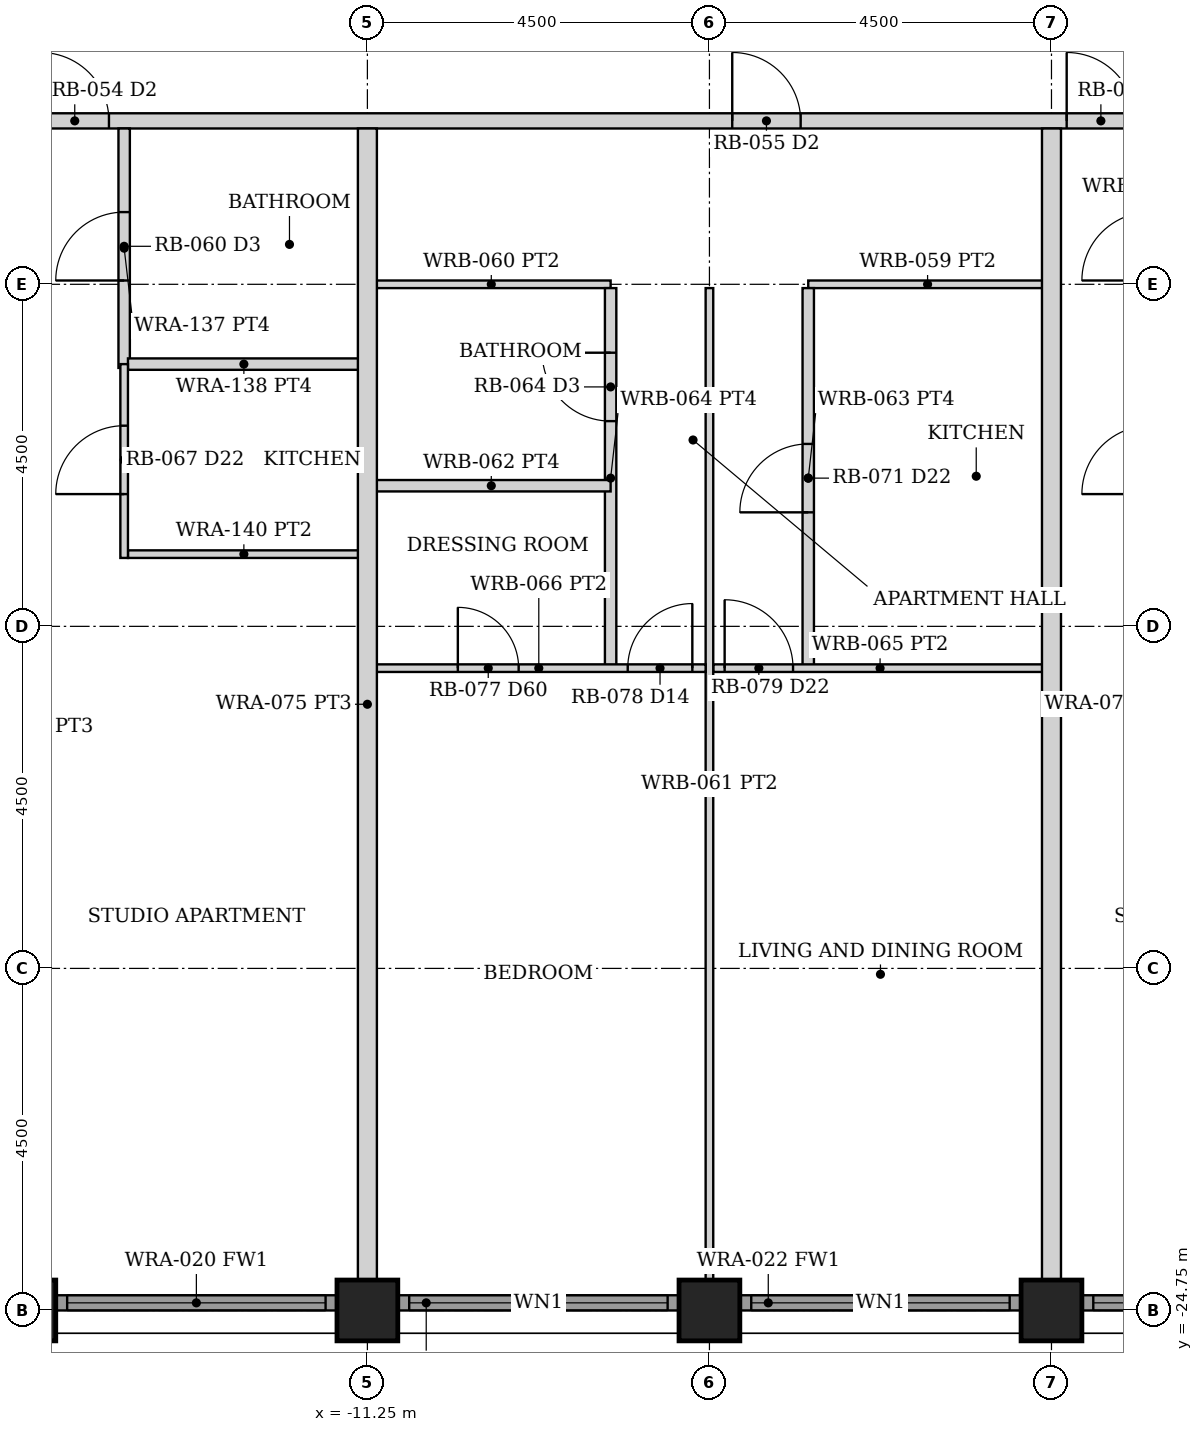
"""IFC4 building model, lengths in metres.
Left out: names, types, materials, properties, quantities, classifications, styles, units other than length and angle.
Written with IfcOpenShell. Run it as: python <this file> out.ifc"""

import sys

from ifc_helpers import new_model, si_unit, direction, frame, frame_2d, origin, origin_2d, place, context, subcontext, project, spatial, rectangle, hollow_rectangle, extrude, element, fill, save


model = new_model("IFC4")
c1 = context("Model", 3, precision=1e-05, world=origin(), true_north=direction((0.0, 1.0)))
c2 = subcontext(c1, "Body", "Model", "MODEL_VIEW")
j1 = project(units=[si_unit("LENGTHUNIT", "METRE"), si_unit("PLANEANGLEUNIT", "RADIAN")], contexts=[c1])
p1 = place(None, origin())
s1 = spatial("IfcSite", under=j1, at=p1, CompositionType="ELEMENT")
p2 = place(p1, origin())
s2 = spatial("IfcBuilding", under=s1, at=p2, CompositionType="ELEMENT")
p3 = place(p2, frame((0.0, 0.0, 37.0)))
s3 = spatial("IfcBuildingStorey", under=s2, at=p3, CompositionType="ELEMENT", Elevation=37.0)
for number, where, z_axis, x_axis in (
    (1, (-15.75, -24.75, 0.0), (0.0, 0.0, 1.0), (0.0, 1.0, 0.0)),
    (2, (-11.25, -24.75, 0.0), (0.0, 0.0, 1.0), (0.0, 1.0, 0.0)),
    (3, (-6.75, -24.75, 0.0), (0.0, 0.0, 1.0), (0.0, 1.0, 0.0)),
    (4, (-2.25, -24.75, 0.0), (0.0, 0.0, 1.0), (0.0, 1.0, 0.0)),
):
    element("IfcColumn", number, at=place(p3, frame(where, z_axis=z_axis, x_axis=x_axis)), inside=s3, PredefinedType="COLUMN", context=c2, shape_type="SweptSolid", body=[
        extrude(hollow_rectangle(XDim=0.8, YDim=0.8, WallThickness=0.07, at=origin_2d()), origin(), (0.0, 0.0, 1.0), 3.5),
    ])
p4 = place(p3, frame((-15.345, -24.65, 0.0), z_axis=(0.0, 0.0, 1.0), x_axis=(1.0, 0.0, 0.0)))
e5 = element("IfcWall", 5, at=p4, inside=s3, PredefinedType="SOLIDWALL", context=c2, shape_type="SweptSolid", body=[
    extrude(rectangle(XDim=3.69, YDim=0.2, at=frame_2d((1.845, 0.0))), origin(), (0.0, 0.0, 1.0), 2.379),
])
p5 = place(p4, frame((0.145, 0.0, 0.3)))
e6 = element("IfcOpeningElement", 6, at=p5, cuts=e5, PredefinedType="OPENING", context=c2, shape_type="SweptSolid", body=[
    extrude(rectangle(XDim=3.4, YDim=1.929, at=frame_2d((1.7, 0.964))), frame((0.0, 0.11, 0.0), z_axis=(0.0, -1.0, 0.0), x_axis=(1.0, 0.0, 0.0)), (0.0, 0.0, 1.0), 0.22),
])
p6 = place(p3, frame((-10.845, -24.65, 0.0), z_axis=(0.0, 0.0, 1.0), x_axis=(1.0, 0.0, 0.0)))
e7 = element("IfcWall", 7, at=p6, inside=s3, PredefinedType="SOLIDWALL", context=c2, shape_type="SweptSolid", body=[
    extrude(rectangle(XDim=3.69, YDim=0.2, at=frame_2d((1.845, 0.0))), origin(), (0.0, 0.0, 1.0), 2.379),
])
p7 = place(p6, frame((0.145, 0.0, 0.3)))
e8 = element("IfcOpeningElement", 8, at=p7, cuts=e7, PredefinedType="OPENING", context=c2, shape_type="SweptSolid", body=[
    extrude(rectangle(XDim=3.4, YDim=1.929, at=frame_2d((1.7, 0.964))), frame((0.0, 0.11, 0.0), z_axis=(0.0, -1.0, 0.0), x_axis=(1.0, 0.0, 0.0)), (0.0, 0.0, 1.0), 0.22),
])
p8 = place(p3, frame((-6.345, -24.65, 0.0), z_axis=(0.0, 0.0, 1.0), x_axis=(1.0, 0.0, 0.0)))
e9 = element("IfcWall", 9, at=p8, inside=s3, PredefinedType="SOLIDWALL", context=c2, shape_type="SweptSolid", body=[
    extrude(rectangle(XDim=3.69, YDim=0.2, at=frame_2d((1.845, 0.0))), origin(), (0.0, 0.0, 1.0), 2.379),
])
p9 = place(p8, frame((0.145, 0.0, 0.3)))
e10 = element("IfcOpeningElement", 10, at=p9, cuts=e9, PredefinedType="OPENING", context=c2, shape_type="SweptSolid", body=[
    extrude(rectangle(XDim=3.4, YDim=1.929, at=frame_2d((1.7, 0.964))), frame((0.0, 0.11, 0.0), z_axis=(0.0, -1.0, 0.0), x_axis=(1.0, 0.0, 0.0)), (0.0, 0.0, 1.0), 0.22),
])
p10 = place(p3, frame((-1.845, -24.65, 0.0), z_axis=(0.0, 0.0, 1.0), x_axis=(1.0, 0.0, 0.0)))
e11 = element("IfcWall", 11, at=p10, inside=s3, PredefinedType="SOLIDWALL", context=c2, shape_type="SweptSolid", body=[
    extrude(rectangle(XDim=3.69, YDim=0.2, at=frame_2d((1.845, 0.0))), origin(), (0.0, 0.0, 1.0), 2.379),
])
p11 = place(p10, frame((0.145, 0.0, 0.3)))
e12 = element("IfcOpeningElement", 12, at=p11, cuts=e11, PredefinedType="OPENING", context=c2, shape_type="SweptSolid", body=[
    extrude(rectangle(XDim=3.4, YDim=1.929, at=frame_2d((1.7, 0.964))), frame((0.0, 0.11, 0.0), z_axis=(0.0, -1.0, 0.0), x_axis=(1.0, 0.0, 0.0)), (0.0, 0.0, 1.0), 0.22),
])
p12 = place(p3, frame((-24.55, -9.1, 0.0), z_axis=(0.0, 0.0, 1.0), x_axis=(1.0, 0.0, 0.0)))
e13 = element("IfcWall", 13, at=p12, inside=s3, PredefinedType="PARTITIONING", context=c2, shape_type="SweptSolid", body=[
    extrude(rectangle(XDim=49.1, YDim=0.2, at=frame_2d((24.55, 0.0))), origin(), (0.0, 0.0, 1.0), 2.373),
])
p13 = place(p12, frame((5.1, 0.0, 0.0)))
e14 = element("IfcOpeningElement", 14, at=p13, cuts=e13, PredefinedType="OPENING", context=c2, shape_type="SweptSolid", body=[
    extrude(rectangle(XDim=0.9, YDim=2.1, at=frame_2d((0.45, 1.05))), frame((0.0, 0.11, 0.0), z_axis=(0.0, -1.0, 0.0), x_axis=(1.0, 0.0, 0.0)), (0.0, 0.0, 1.0), 0.22),
])
p14 = place(p12, frame((9.0, 0.0, 0.0)))
e15 = element("IfcOpeningElement", 15, at=p14, cuts=e13, PredefinedType="OPENING", context=c2, shape_type="SweptSolid", body=[
    extrude(rectangle(XDim=0.9, YDim=2.1, at=frame_2d((0.45, 1.05))), frame((0.0, 0.11, 0.0), z_axis=(0.0, -1.0, 0.0), x_axis=(1.0, 0.0, 0.0)), (0.0, 0.0, 1.0), 0.22),
])
p15 = place(p12, frame((18.1, 0.0, 0.0)))
e16 = element("IfcOpeningElement", 16, at=p15, cuts=e13, PredefinedType="OPENING", context=c2, shape_type="SweptSolid", body=[
    extrude(rectangle(XDim=0.9, YDim=2.1, at=frame_2d((0.45, 1.05))), frame((0.0, 0.11, 0.0), z_axis=(0.0, -1.0, 0.0), x_axis=(1.0, 0.0, 0.0)), (0.0, 0.0, 1.0), 0.22),
])
p16 = place(p12, frame((22.5, 0.0, 0.0)))
e17 = element("IfcOpeningElement", 17, at=p16, cuts=e13, PredefinedType="OPENING", context=c2, shape_type="SweptSolid", body=[
    extrude(rectangle(XDim=0.9, YDim=2.1, at=frame_2d((0.45, 1.05))), frame((0.0, 0.11, 0.0), z_axis=(0.0, -1.0, 0.0), x_axis=(1.0, 0.0, 0.0)), (0.0, 0.0, 1.0), 0.22),
])
p17 = place(p12, frame((27.1, 0.0, 0.0)))
e18 = element("IfcOpeningElement", 18, at=p17, cuts=e13, PredefinedType="OPENING", context=c2, shape_type="SweptSolid", body=[
    extrude(rectangle(XDim=0.9, YDim=2.1, at=frame_2d((0.45, 1.05))), frame((0.0, 0.11, 0.0), z_axis=(0.0, -1.0, 0.0), x_axis=(1.0, 0.0, 0.0)), (0.0, 0.0, 1.0), 0.22),
])
p18 = place(p12, frame((36.0, 0.0, 0.0)))
e19 = element("IfcOpeningElement", 19, at=p18, cuts=e13, PredefinedType="OPENING", context=c2, shape_type="SweptSolid", body=[
    extrude(rectangle(XDim=0.9, YDim=2.1, at=frame_2d((0.45, 1.05))), frame((0.0, 0.11, 0.0), z_axis=(0.0, -1.0, 0.0), x_axis=(1.0, 0.0, 0.0)), (0.0, 0.0, 1.0), 0.22),
])
p19 = place(p12, frame((43.1, 0.0, 0.0)))
e20 = element("IfcOpeningElement", 20, at=p19, cuts=e13, PredefinedType="OPENING", context=c2, shape_type="SweptSolid", body=[
    extrude(rectangle(XDim=0.9, YDim=2.1, at=frame_2d((0.45, 1.05))), frame((0.0, 0.11, 0.0), z_axis=(0.0, -1.0, 0.0), x_axis=(1.0, 0.0, 0.0)), (0.0, 0.0, 1.0), 0.22),
])
p20 = place(p3, frame((-14.45, -12.35, 0.0), z_axis=(0.0, 0.0, 1.0), x_axis=(0.0, 1.0, 0.0)))
e21 = element("IfcWall", 21, at=p20, inside=s3, PredefinedType="PARTITIONING", context=c2, shape_type="SweptSolid", body=[
    extrude(rectangle(XDim=3.15, YDim=0.15, at=frame_2d((1.575, 0.0))), origin(), (0.0, 0.0, 1.0), 2.373),
])
p21 = place(p20, frame((1.15, 0.0, 0.0)))
e22 = element("IfcOpeningElement", 22, at=p21, cuts=e21, PredefinedType="OPENING", context=c2, shape_type="SweptSolid", body=[
    extrude(rectangle(XDim=0.9, YDim=2.1, at=frame_2d((0.45, 1.05))), frame((0.0, 0.085, 0.0), z_axis=(0.0, -1.0, 0.0), x_axis=(1.0, 0.0, 0.0)), (0.0, 0.0, 1.0), 0.17),
])
p22 = place(p3, frame((-14.4, -12.3, 0.0), z_axis=(0.0, 0.0, 1.0), x_axis=(1.0, 0.0, 0.0)))
e23 = element("IfcWall", 23, at=p22, inside=s3, PredefinedType="PARTITIONING", context=c2, shape_type="SweptSolid", body=[
    extrude(rectangle(XDim=3.05, YDim=0.15, at=frame_2d((1.525, 0.0))), origin(), (0.0, 0.0, 1.0), 2.373),
])
p23 = place(p3, frame((-14.4, -14.8, 0.0), z_axis=(0.0, 0.0, 1.0), x_axis=(1.0, 0.0, 0.0)))
e24 = element("IfcWall", 24, at=p23, inside=s3, PredefinedType="PARTITIONING", context=c2, shape_type="SweptSolid", body=[
    extrude(rectangle(XDim=3.05, YDim=0.1, at=frame_2d((1.525, 0.0))), origin(), (0.0, 0.0, 1.0), 2.373),
])
p24 = place(p3, frame((-14.45, -14.85, 0.0), z_axis=(0.0, 0.0, 1.0), x_axis=(0.0, 1.0, 0.0)))
e25 = element("IfcWall", 25, at=p24, inside=s3, PredefinedType="PARTITIONING", context=c2, shape_type="SweptSolid", body=[
    extrude(rectangle(XDim=2.55, YDim=0.1, at=frame_2d((1.275, 0.0))), origin(), (0.0, 0.0, 1.0), 2.373),
])
p25 = place(p24, frame((0.84, 0.0, 0.0)))
e26 = element("IfcOpeningElement", 26, at=p25, cuts=e25, PredefinedType="OPENING", context=c2, shape_type="SweptSolid", body=[
    extrude(rectangle(XDim=0.9, YDim=2.1, at=frame_2d((0.45, 1.05))), frame((0.0, 0.06, 0.0), z_axis=(0.0, -1.0, 0.0), x_axis=(1.0, 0.0, 0.0)), (0.0, 0.0, 1.0), 0.12),
])
p26 = place(p3, frame((-5.45, -11.25, 0.0), z_axis=(0.0, 0.0, 1.0), x_axis=(1.0, 0.0, 0.0)))
e27 = element("IfcWall", 27, at=p26, inside=s3, PredefinedType="PARTITIONING", context=c2, shape_type="SweptSolid", body=[
    extrude(rectangle(XDim=3.14, YDim=0.1, at=frame_2d((1.57, 0.0))), origin(), (0.0, 0.0, 1.0), 2.373),
])
p27 = place(p3, frame((-5.45, -16.3, 0.0), z_axis=(0.0, 0.0, 1.0), x_axis=(0.0, 1.0, 0.0)))
e28 = element("IfcWall", 28, at=p27, inside=s3, PredefinedType="PARTITIONING", context=c2, shape_type="SweptSolid", body=[
    extrude(rectangle(XDim=5.0, YDim=0.15, at=frame_2d((2.5, 0.0))), origin(), (0.0, 0.0, 1.0), 2.373),
])
p28 = place(p27, frame((2.05, 0.0, 0.0)))
e29 = element("IfcOpeningElement", 29, at=p28, cuts=e28, PredefinedType="OPENING", context=c2, shape_type="SweptSolid", body=[
    extrude(rectangle(XDim=0.9, YDim=2.1, at=frame_2d((0.45, 1.05))), frame((0.0, 0.085, 0.0), z_axis=(0.0, -1.0, 0.0), x_axis=(1.0, 0.0, 0.0)), (0.0, 0.0, 1.0), 0.17),
])
p29 = place(p3, frame((-6.7, -16.3, 0.0), z_axis=(0.0, 0.0, 1.0), x_axis=(1.0, 0.0, 0.0)))
e30 = element("IfcWall", 30, at=p29, inside=s3, PredefinedType="PARTITIONING", context=c2, shape_type="SweptSolid", body=[
    extrude(rectangle(XDim=4.39, YDim=0.1, at=frame_2d((2.195, 0.0))), origin(), (0.0, 0.0, 1.0), 2.373),
])
p30 = place(p29, frame((0.15, 0.0, 0.0)))
e31 = element("IfcOpeningElement", 31, at=p30, cuts=e30, PredefinedType="OPENING", context=c2, shape_type="SweptSolid", body=[
    extrude(rectangle(XDim=0.9, YDim=2.1, at=frame_2d((0.45, 1.05))), frame((0.0, 0.06, 0.0), z_axis=(0.0, -1.0, 0.0), x_axis=(1.0, 0.0, 0.0)), (0.0, 0.0, 1.0), 0.12),
])
p31 = place(p3, frame((-6.75, -24.35, 0.0), z_axis=(0.0, 0.0, 1.0), x_axis=(0.0, 1.0, 0.0)))
e32 = element("IfcWall", 32, at=p31, inside=s3, PredefinedType="PARTITIONING", context=c2, shape_type="SweptSolid", body=[
    extrude(rectangle(XDim=13.05, YDim=0.1, at=frame_2d((6.525, 0.0))), origin(), (0.0, 0.0, 1.0), 2.373),
])
p32 = place(p3, frame((-11.19, -11.25, 0.0), z_axis=(0.0, 0.0, 1.0), x_axis=(1.0, 0.0, 0.0)))
e33 = element("IfcWall", 33, at=p32, inside=s3, PredefinedType="PARTITIONING", context=c2, shape_type="SweptSolid", body=[
    extrude(rectangle(XDim=3.14, YDim=0.1, at=frame_2d((1.57, 0.0))), origin(), (0.0, 0.0, 1.0), 2.373),
])
p33 = place(p3, frame((-8.05, -16.3, 0.0), z_axis=(0.0, 0.0, 1.0), x_axis=(0.0, 1.0, 0.0)))
e34 = element("IfcWall", 34, at=p33, inside=s3, PredefinedType="PARTITIONING", context=c2, shape_type="SweptSolid", body=[
    extrude(rectangle(XDim=5.0, YDim=0.15, at=frame_2d((2.5, 0.0))), origin(), (0.0, 0.0, 1.0), 2.373),
])
p34 = place(p33, frame((3.25, 0.0, 0.0)))
e35 = element("IfcOpeningElement", 35, at=p34, cuts=e34, PredefinedType="OPENING", context=c2, shape_type="SweptSolid", body=[
    extrude(rectangle(XDim=0.9, YDim=2.1, at=frame_2d((0.45, 1.05))), frame((0.0, 0.085, 0.0), z_axis=(0.0, -1.0, 0.0), x_axis=(1.0, 0.0, 0.0)), (0.0, 0.0, 1.0), 0.17),
])
p35 = place(p3, frame((-11.19, -16.3, 0.0), z_axis=(0.0, 0.0, 1.0), x_axis=(1.0, 0.0, 0.0)))
e36 = element("IfcWall", 36, at=p35, inside=s3, PredefinedType="PARTITIONING", context=c2, shape_type="SweptSolid", body=[
    extrude(rectangle(XDim=4.39, YDim=0.1, at=frame_2d((2.195, 0.0))), origin(), (0.0, 0.0, 1.0), 2.373),
])
p36 = place(p35, frame((3.365, 0.0, 0.0)))
e37 = element("IfcOpeningElement", 37, at=p36, cuts=e36, PredefinedType="OPENING", context=c2, shape_type="SweptSolid", body=[
    extrude(rectangle(XDim=0.85, YDim=2.1, at=frame_2d((0.425, 1.05))), frame((0.0, 0.06, 0.0), z_axis=(0.0, -1.0, 0.0), x_axis=(1.0, 0.0, 0.0)), (0.0, 0.0, 1.0), 0.12),
])
p37 = place(p35, frame((1.13, 0.0, 0.0)))
e38 = element("IfcOpeningElement", 38, at=p37, cuts=e36, PredefinedType="OPENING", context=c2, shape_type="SweptSolid", body=[
    extrude(rectangle(XDim=0.8, YDim=2.1, at=frame_2d((0.4, 1.05))), frame((0.0, 0.06, 0.0), z_axis=(0.0, -1.0, 0.0), x_axis=(1.0, 0.0, 0.0)), (0.0, 0.0, 1.0), 0.12),
])
p38 = place(p3, frame((-11.19, -13.9, 0.0), z_axis=(0.0, 0.0, 1.0), x_axis=(1.0, 0.0, 0.0)))
e39 = element("IfcWall", 39, at=p38, inside=s3, PredefinedType="PARTITIONING", context=c2, shape_type="SweptSolid", body=[
    extrude(rectangle(XDim=3.14, YDim=0.15, at=frame_2d((1.57, 0.0))), origin(), (0.0, 0.0, 1.0), 2.373),
])
for number, where, z_axis, x_axis in (
    (40, (-11.25, -24.35, 0.0), (0.0, 0.0, 1.0), (0.0, 1.0, 0.0)),
    (41, (-2.25, -24.35, 0.0), (0.0, 0.0, 1.0), (0.0, 1.0, 0.0)),
):
    element("IfcWall", number, at=place(p3, frame(where, z_axis=z_axis, x_axis=x_axis)), inside=s3, PredefinedType="PARTITIONING", context=c2, shape_type="SweptSolid", body=[
        extrude(rectangle(XDim=15.15, YDim=0.25, at=frame_2d((7.575, 0.0))), origin(), (0.0, 0.0, 1.0), 2.373),
    ])
p39 = place(p5, origin())
e42 = element("IfcWindow", 42, at=p39, inside=s3, PartitioningType="SINGLE_PANEL", PredefinedType="WINDOW", context=c2, shape_type="SweptSolid", body=[
    extrude(rectangle(XDim=3.4, YDim=1.929, at=frame_2d((1.7, 0.964))), frame((0.0, 0.03, 0.0), z_axis=(0.0, -1.0, 0.0), x_axis=(1.0, 0.0, 0.0)), (0.0, 0.0, 1.0), 0.06),
])
fill(e6, e42)
p40 = place(p7, origin())
e43 = element("IfcWindow", 43, at=p40, inside=s3, PartitioningType="SINGLE_PANEL", PredefinedType="WINDOW", context=c2, shape_type="SweptSolid", body=[
    extrude(rectangle(XDim=3.4, YDim=1.929, at=frame_2d((1.7, 0.964))), frame((0.0, 0.03, 0.0), z_axis=(0.0, -1.0, 0.0), x_axis=(1.0, 0.0, 0.0)), (0.0, 0.0, 1.0), 0.06),
])
fill(e8, e43)
p41 = place(p9, origin())
e44 = element("IfcWindow", 44, at=p41, inside=s3, PartitioningType="SINGLE_PANEL", PredefinedType="WINDOW", context=c2, shape_type="SweptSolid", body=[
    extrude(rectangle(XDim=3.4, YDim=1.929, at=frame_2d((1.7, 0.964))), frame((0.0, 0.03, 0.0), z_axis=(0.0, -1.0, 0.0), x_axis=(1.0, 0.0, 0.0)), (0.0, 0.0, 1.0), 0.06),
])
fill(e10, e44)
p42 = place(p11, origin())
e45 = element("IfcWindow", 45, at=p42, inside=s3, PartitioningType="SINGLE_PANEL", PredefinedType="WINDOW", context=c2, shape_type="SweptSolid", body=[
    extrude(rectangle(XDim=3.4, YDim=1.929, at=frame_2d((1.7, 0.964))), frame((0.0, 0.03, 0.0), z_axis=(0.0, -1.0, 0.0), x_axis=(1.0, 0.0, 0.0)), (0.0, 0.0, 1.0), 0.06),
])
fill(e12, e45)
p43 = place(p14, origin())
e46 = element("IfcDoor", 46, at=p43, inside=s3, OperationType="SINGLE_SWING_LEFT", PredefinedType="DOOR", context=c2, shape_type="SweptSolid", body=[
    extrude(rectangle(XDim=0.9, YDim=2.1, at=frame_2d((0.45, 1.05))), frame((0.0, 0.025, 0.0), z_axis=(0.0, -1.0, 0.0), x_axis=(1.0, 0.0, 0.0)), (0.0, 0.0, 1.0), 0.05),
])
fill(e15, e46)
p44 = place(p21, origin())
e47 = element("IfcDoor", 47, at=p44, inside=s3, OperationType="SINGLE_SWING_LEFT", PredefinedType="DOOR", context=c2, shape_type="SweptSolid", body=[
    extrude(rectangle(XDim=0.9, YDim=2.1, at=frame_2d((0.45, 1.05))), frame((0.0, 0.025, 0.0), z_axis=(0.0, -1.0, 0.0), x_axis=(1.0, 0.0, 0.0)), (0.0, 0.0, 1.0), 0.05),
])
fill(e22, e47)
p45 = place(p25, origin())
e48 = element("IfcDoor", 48, at=p45, inside=s3, OperationType="SINGLE_SWING_LEFT", PredefinedType="DOOR", context=c2, shape_type="SweptSolid", body=[
    extrude(rectangle(XDim=0.9, YDim=2.1, at=frame_2d((0.45, 1.05))), frame((0.0, 0.025, 0.0), z_axis=(0.0, -1.0, 0.0), x_axis=(1.0, 0.0, 0.0)), (0.0, 0.0, 1.0), 0.05),
])
fill(e26, e48)
p46 = place(p15, origin())
e49 = element("IfcDoor", 49, at=p46, inside=s3, OperationType="SINGLE_SWING_LEFT", PredefinedType="DOOR", context=c2, shape_type="SweptSolid", body=[
    extrude(rectangle(XDim=0.9, YDim=2.1, at=frame_2d((0.45, 1.05))), frame((0.0, 0.025, 0.0), z_axis=(0.0, -1.0, 0.0), x_axis=(1.0, 0.0, 0.0)), (0.0, 0.0, 1.0), 0.05),
])
fill(e16, e49)
p47 = place(p28, origin())
e50 = element("IfcDoor", 50, at=p47, inside=s3, OperationType="SINGLE_SWING_LEFT", PredefinedType="DOOR", context=c2, shape_type="SweptSolid", body=[
    extrude(rectangle(XDim=0.9, YDim=2.1, at=frame_2d((0.45, 1.05))), frame((0.0, 0.025, 0.0), z_axis=(0.0, -1.0, 0.0), x_axis=(1.0, 0.0, 0.0)), (0.0, 0.0, 1.0), 0.05),
])
fill(e29, e50)
p48 = place(p30, origin())
e51 = element("IfcDoor", 51, at=p48, inside=s3, OperationType="SINGLE_SWING_LEFT", PredefinedType="DOOR", context=c2, shape_type="SweptSolid", body=[
    extrude(rectangle(XDim=0.9, YDim=2.1, at=frame_2d((0.45, 1.05))), frame((0.0, 0.025, 0.0), z_axis=(0.0, -1.0, 0.0), x_axis=(1.0, 0.0, 0.0)), (0.0, 0.0, 1.0), 0.05),
])
fill(e31, e51)
p49 = place(p36, origin())
e52 = element("IfcDoor", 52, at=p49, inside=s3, OperationType="SINGLE_SWING_RIGHT", PredefinedType="DOOR", context=c2, shape_type="SweptSolid", body=[
    extrude(rectangle(XDim=0.85, YDim=2.1, at=frame_2d((0.425, 1.05))), frame((0.0, 0.025, 0.0), z_axis=(0.0, -1.0, 0.0), x_axis=(1.0, 0.0, 0.0)), (0.0, 0.0, 1.0), 0.05),
])
fill(e37, e52)
p50 = place(p34, origin())
e53 = element("IfcDoor", 53, at=p50, inside=s3, OperationType="SINGLE_SWING_RIGHT", PredefinedType="DOOR", context=c2, shape_type="SweptSolid", body=[
    extrude(rectangle(XDim=0.9, YDim=2.1, at=frame_2d((0.45, 1.05))), frame((0.0, 0.025, 0.0), z_axis=(0.0, -1.0, 0.0), x_axis=(1.0, 0.0, 0.0)), (0.0, 0.0, 1.0), 0.05),
])
fill(e35, e53)
p51 = place(p37, origin())
e54 = element("IfcDoor", 54, at=p51, inside=s3, OperationType="SINGLE_SWING_LEFT", PredefinedType="DOOR", context=c2, shape_type="SweptSolid", body=[
    extrude(rectangle(XDim=0.8, YDim=2.1, at=frame_2d((0.4, 1.05))), frame((0.0, 0.025, 0.0), z_axis=(0.0, -1.0, 0.0), x_axis=(1.0, 0.0, 0.0)), (0.0, 0.0, 1.0), 0.05),
])
fill(e38, e54)
p52 = place(p16, origin())
e55 = element("IfcDoor", 55, at=p52, inside=s3, OperationType="SINGLE_SWING_LEFT", PredefinedType="DOOR", context=c2, shape_type="SweptSolid", body=[
    extrude(rectangle(XDim=0.9, YDim=2.1, at=frame_2d((0.45, 1.05))), frame((0.0, 0.025, 0.0), z_axis=(0.0, -1.0, 0.0), x_axis=(1.0, 0.0, 0.0)), (0.0, 0.0, 1.0), 0.05),
])
fill(e17, e55)
save(model, sys.argv[1])
